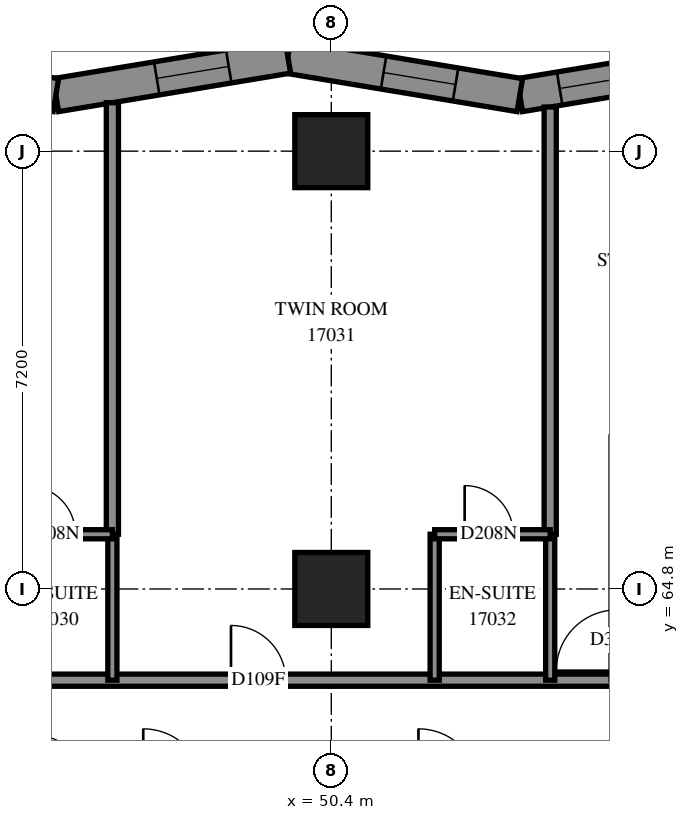
"""IFC4 building model, lengths in metres.
Left out: names, types, materials, properties, quantities, classifications, styles, units other than length and angle.
Written with IfcOpenShell. Run it as: python <this file> out.ifc"""

import sys

from ifc_helpers import new_model, si_unit, direction, frame, frame_2d, origin, origin_2d, place, context, subcontext, project, spatial, polyline, rectangle, outline, extrude, element, fill, save


model = new_model("IFC4")
c1 = context("Model", 3, precision=1e-05, world=origin(), true_north=direction((0.0, 1.0)))
c2 = subcontext(c1, "Body", "Model", "MODEL_VIEW")
j1 = project(units=[si_unit("LENGTHUNIT", "METRE"), si_unit("PLANEANGLEUNIT", "RADIAN")], contexts=[c1])
p1 = place(None, origin())
s1 = spatial("IfcSite", under=j1, at=p1, CompositionType="ELEMENT")
p2 = place(p1, origin())
s2 = spatial("IfcBuilding", under=s1, at=p2, CompositionType="ELEMENT")
p3 = place(p2, frame((0.0, 0.0, 64.4)))
s3 = spatial("IfcBuildingStorey", under=s2, at=p3, CompositionType="ELEMENT", Elevation=64.4)
for number, where, z_axis, x_axis in (
    (1, (50.4, 64.8, 0.0), (0.0, 0.0, 1.0), (1.0, 0.0, 0.0)),
    (2, (50.4, 72.0, 0.0), (0.0, 0.0, 1.0), (1.0, 0.0, 0.0)),
):
    element("IfcColumn", number, at=place(p3, frame(where, z_axis=z_axis, x_axis=x_axis)), inside=s3, PredefinedType="COLUMN", context=c2, shape_type="SweptSolid", body=[
        extrude(rectangle(XDim=1.2, YDim=1.2, at=origin_2d()), origin(), (0.0, 0.0, 1.0), 3.1),
    ])
p4 = place(p3, frame((57.315, 73.554, 0.0), z_axis=(0.0, 0.0, 1.0), x_axis=(-0.9865110911, -0.1636944324, 0.0)))
e3 = element("IfcWall", 3, at=p4, inside=s3, PredefinedType="SOLIDWALL", context=c2, shape_type="SweptSolid", body=[
    extrude(outline(polyline([(-0.046, -0.275), (3.821, -0.275), (3.913, 0.275), (0.046, 0.275), (-0.046, -0.275)])), origin(), (0.0, 0.0, 1.0), 3.1),
])
p5 = place(p4, frame((0.403, 0.0, 0.5)))
e4 = element("IfcOpeningElement", 4, at=p5, cuts=e3, PredefinedType="OPENING", context=c2, shape_type="SweptSolid", body=[
    extrude(rectangle(XDim=2.8, YDim=2.45, at=frame_2d((1.4, 1.225))), frame((0.0, 0.285, 0.0), z_axis=(0.0, -1.0, 0.0), x_axis=(1.0, 0.0, 0.0)), (0.0, 0.0, 1.0), 0.57),
])
p6 = place(p3, frame((53.5, 72.921, 0.0), z_axis=(0.0, 0.0, 1.0), x_axis=(-0.9865110911, 0.1636944324, 0.0)))
e5 = element("IfcWall", 5, at=p6, inside=s3, PredefinedType="SOLIDWALL", context=c2, shape_type="SweptSolid", body=[
    extrude(outline(polyline([(0.046, -0.275), (3.913, -0.275), (3.821, 0.275), (-0.046, 0.275), (0.046, -0.275)])), origin(), (0.0, 0.0, 1.0), 3.1),
])
p7 = place(p6, frame((1.071, 0.0, 0.5)))
e6 = element("IfcOpeningElement", 6, at=p7, cuts=e5, PredefinedType="OPENING", context=c2, shape_type="SweptSolid", body=[
    extrude(rectangle(XDim=1.2, YDim=2.45, at=frame_2d((0.6, 1.225))), frame((0.0, 0.285, 0.0), z_axis=(0.0, -1.0, 0.0), x_axis=(1.0, 0.0, 0.0)), (0.0, 0.0, 1.0), 0.57),
])
p8 = place(p3, frame((49.685, 73.554, 0.0), z_axis=(0.0, 0.0, 1.0), x_axis=(-0.9865110911, -0.1636944324, 0.0)))
e7 = element("IfcWall", 7, at=p8, inside=s3, PredefinedType="SOLIDWALL", context=c2, shape_type="SweptSolid", body=[
    extrude(outline(polyline([(-0.046, -0.275), (3.821, -0.275), (3.913, 0.275), (0.046, 0.275), (-0.046, -0.275)])), origin(), (0.0, 0.0, 1.0), 3.1),
])
p9 = place(p8, frame((0.985, 0.0, 0.5)))
e8 = element("IfcOpeningElement", 8, at=p9, cuts=e7, PredefinedType="OPENING", context=c2, shape_type="SweptSolid", body=[
    extrude(rectangle(XDim=1.2, YDim=2.45, at=frame_2d((0.6, 1.225))), frame((0.0, 0.285, 0.0), z_axis=(0.0, -1.0, 0.0), x_axis=(1.0, 0.0, 0.0)), (0.0, 0.0, 1.0), 0.57),
])
p10 = place(p3, frame((45.87, 72.921, 0.0), z_axis=(0.0, 0.0, 1.0), x_axis=(-0.9865110911, 0.1636944324, 0.0)))
e9 = element("IfcWall", 9, at=p10, inside=s3, PredefinedType="SOLIDWALL", context=c2, shape_type="SweptSolid", body=[
    extrude(outline(polyline([(0.046, -0.275), (3.913, -0.275), (3.821, 0.275), (-0.046, 0.275), (0.046, -0.275)])), origin(), (0.0, 0.0, 1.0), 3.1),
])
p11 = place(p10, frame((0.854, 0.0, 0.5)))
e10 = element("IfcOpeningElement", 10, at=p11, cuts=e9, PredefinedType="OPENING", context=c2, shape_type="SweptSolid", body=[
    extrude(rectangle(XDim=1.2, YDim=2.45, at=frame_2d((0.6, 1.225))), frame((0.0, 0.285, 0.0), z_axis=(0.0, -1.0, 0.0), x_axis=(1.0, 0.0, 0.0)), (0.0, 0.0, 1.0), 0.57),
])
p12 = place(p3, frame((33.302, 63.3, 0.0), z_axis=(0.0, 0.0, 1.0), x_axis=(1.0, 0.0, 0.0)))
e11 = element("IfcWall", 11, at=p12, inside=s3, PredefinedType="PARTITIONING", context=c2, shape_type="SweptSolid", body=[
    extrude(rectangle(XDim=21.798, YDim=0.2, at=frame_2d((10.899, 0.0))), origin(), (0.0, 0.0, 1.0), 3.1),
])
p13 = place(p12, frame((1.091, 0.0, 0.0)))
e12 = element("IfcOpeningElement", 12, at=p13, cuts=e11, PredefinedType="OPENING", context=c2, shape_type="SweptSolid", body=[
    extrude(rectangle(XDim=0.9, YDim=2.1, at=frame_2d((0.45, 1.05))), frame((0.0, 0.11, 0.0), z_axis=(0.0, -1.0, 0.0), x_axis=(1.0, 0.0, 0.0)), (0.0, 0.0, 1.0), 0.22),
])
p14 = place(p12, frame((8.248, 0.0, 0.0)))
e13 = element("IfcOpeningElement", 13, at=p14, cuts=e11, PredefinedType="OPENING", context=c2, shape_type="SweptSolid", body=[
    extrude(rectangle(XDim=0.9, YDim=2.1, at=frame_2d((0.45, 1.05))), frame((0.0, 0.11, 0.0), z_axis=(0.0, -1.0, 0.0), x_axis=(1.0, 0.0, 0.0)), (0.0, 0.0, 1.0), 0.22),
])
p15 = place(p12, frame((15.448, 0.0, 0.0)))
e14 = element("IfcOpeningElement", 14, at=p15, cuts=e11, PredefinedType="OPENING", context=c2, shape_type="SweptSolid", body=[
    extrude(rectangle(XDim=0.9, YDim=2.1, at=frame_2d((0.45, 1.05))), frame((0.0, 0.11, 0.0), z_axis=(0.0, -1.0, 0.0), x_axis=(1.0, 0.0, 0.0)), (0.0, 0.0, 1.0), 0.22),
])
p16 = place(p3, frame((46.8, 65.7, 0.0), z_axis=(0.0, 0.0, 1.0), x_axis=(0.0, 1.0, 0.0)))
e15 = element("IfcWall", 15, at=p16, inside=s3, PredefinedType="PARTITIONING", context=c2, shape_type="SweptSolid", body=[
    extrude(rectangle(XDim=7.097, YDim=0.2, at=frame_2d((3.548, 0.0))), origin(), (0.0, 0.0, 1.0), 3.1),
])
p17 = place(p3, frame((54.0, 65.7, 0.0), z_axis=(0.0, 0.0, 1.0), x_axis=(0.0, 1.0, 0.0)))
e16 = element("IfcWall", 16, at=p17, inside=s3, PredefinedType="PARTITIONING", context=c2, shape_type="SweptSolid", body=[
    extrude(rectangle(XDim=7.025, YDim=0.2, at=frame_2d((3.513, 0.0))), origin(), (0.0, 0.0, 1.0), 3.1),
])
for number, where, z_axis, x_axis in (
    (17, (46.8, 63.3, 0.0), (0.0, 0.0, 1.0), (0.0, 1.0, 0.0)),
    (18, (52.1, 63.3, 0.0), (0.0, 0.0, 1.0), (0.0, 1.0, 0.0)),
    (19, (54.0, 63.3, 0.0), (0.0, 0.0, 1.0), (0.0, 1.0, 0.0)),
):
    element("IfcWall", number, at=place(p3, frame(where, z_axis=z_axis, x_axis=x_axis)), inside=s3, PredefinedType="PARTITIONING", context=c2, shape_type="SweptSolid", body=[
        extrude(rectangle(XDim=2.4, YDim=0.15, at=frame_2d((1.2, 0.0))), origin(), (0.0, 0.0, 1.0), 3.1),
    ])
p18 = place(p3, frame((44.9, 65.7, 0.0), z_axis=(0.0, 0.0, 1.0), x_axis=(1.0, 0.0, 0.0)))
e20 = element("IfcWall", 20, at=p18, inside=s3, PredefinedType="PARTITIONING", context=c2, shape_type="SweptSolid", body=[
    extrude(rectangle(XDim=1.9, YDim=0.15, at=frame_2d((0.95, 0.0))), origin(), (0.0, 0.0, 1.0), 3.1),
])
p19 = place(p18, frame((0.493, 0.0, 0.0)))
e21 = element("IfcOpeningElement", 21, at=p19, cuts=e20, PredefinedType="OPENING", context=c2, shape_type="SweptSolid", body=[
    extrude(rectangle(XDim=0.8, YDim=2.1, at=frame_2d((0.4, 1.05))), frame((0.0, 0.085, 0.0), z_axis=(0.0, -1.0, 0.0), x_axis=(1.0, 0.0, 0.0)), (0.0, 0.0, 1.0), 0.17),
])
p20 = place(p3, frame((52.1, 65.7, 0.0), z_axis=(0.0, 0.0, 1.0), x_axis=(1.0, 0.0, 0.0)))
e22 = element("IfcWall", 22, at=p20, inside=s3, PredefinedType="PARTITIONING", context=c2, shape_type="SweptSolid", body=[
    extrude(rectangle(XDim=1.9, YDim=0.15, at=frame_2d((0.95, 0.0))), origin(), (0.0, 0.0, 1.0), 3.1),
])
p21 = place(p20, frame((0.493, 0.0, 0.0)))
e23 = element("IfcOpeningElement", 23, at=p21, cuts=e22, PredefinedType="OPENING", context=c2, shape_type="SweptSolid", body=[
    extrude(rectangle(XDim=0.8, YDim=2.1, at=frame_2d((0.4, 1.05))), frame((0.0, 0.085, 0.0), z_axis=(0.0, -1.0, 0.0), x_axis=(1.0, 0.0, 0.0)), (0.0, 0.0, 1.0), 0.17),
])
p22 = place(p5, origin())
e24 = element("IfcWindow", 24, at=p22, inside=s3, PartitioningType="SINGLE_PANEL", PredefinedType="WINDOW", context=c2, shape_type="SweptSolid", body=[
    extrude(rectangle(XDim=2.8, YDim=2.45, at=frame_2d((1.4, 1.225))), frame((0.0, 0.155, 0.0), z_axis=(0.0, -1.0, 0.0), x_axis=(1.0, 0.0, 0.0)), (0.0, 0.0, 1.0), 0.06),
])
fill(e4, e24)
p23 = place(p7, origin())
e25 = element("IfcWindow", 25, at=p23, inside=s3, PartitioningType="SINGLE_PANEL", PredefinedType="WINDOW", context=c2, shape_type="SweptSolid", body=[
    extrude(rectangle(XDim=1.2, YDim=2.45, at=frame_2d((0.6, 1.225))), frame((0.0, 0.155, 0.0), z_axis=(0.0, -1.0, 0.0), x_axis=(1.0, 0.0, 0.0)), (0.0, 0.0, 1.0), 0.06),
])
fill(e6, e25)
p24 = place(p9, origin())
e26 = element("IfcWindow", 26, at=p24, inside=s3, PartitioningType="SINGLE_PANEL", PredefinedType="WINDOW", context=c2, shape_type="SweptSolid", body=[
    extrude(rectangle(XDim=1.2, YDim=2.45, at=frame_2d((0.6, 1.225))), frame((0.0, 0.155, 0.0), z_axis=(0.0, -1.0, 0.0), x_axis=(1.0, 0.0, 0.0)), (0.0, 0.0, 1.0), 0.06),
])
fill(e8, e26)
p25 = place(p19, origin())
e27 = element("IfcDoor", 27, at=p25, inside=s3, OperationType="SINGLE_SWING_RIGHT", PredefinedType="DOOR", context=c2, shape_type="SweptSolid", body=[
    extrude(rectangle(XDim=0.8, YDim=2.1, at=frame_2d((0.4, 1.05))), frame((0.0, 0.025, 0.0), z_axis=(0.0, -1.0, 0.0), x_axis=(1.0, 0.0, 0.0)), (0.0, 0.0, 1.0), 0.05),
])
fill(e21, e27)
p26 = place(p15, origin())
e28 = element("IfcDoor", 28, at=p26, inside=s3, OperationType="SINGLE_SWING_LEFT", PredefinedType="DOOR", context=c2, shape_type="SweptSolid", body=[
    extrude(rectangle(XDim=0.9, YDim=2.1, at=frame_2d((0.45, 1.05))), frame((0.0, 0.025, 0.0), z_axis=(0.0, -1.0, 0.0), x_axis=(1.0, 0.0, 0.0)), (0.0, 0.0, 1.0), 0.05),
])
fill(e14, e28)
p27 = place(p21, origin())
e29 = element("IfcDoor", 29, at=p27, inside=s3, OperationType="SINGLE_SWING_RIGHT", PredefinedType="DOOR", context=c2, shape_type="SweptSolid", body=[
    extrude(rectangle(XDim=0.8, YDim=2.1, at=frame_2d((0.4, 1.05))), frame((0.0, 0.025, 0.0), z_axis=(0.0, -1.0, 0.0), x_axis=(1.0, 0.0, 0.0)), (0.0, 0.0, 1.0), 0.05),
])
fill(e23, e29)
save(model, sys.argv[1])
